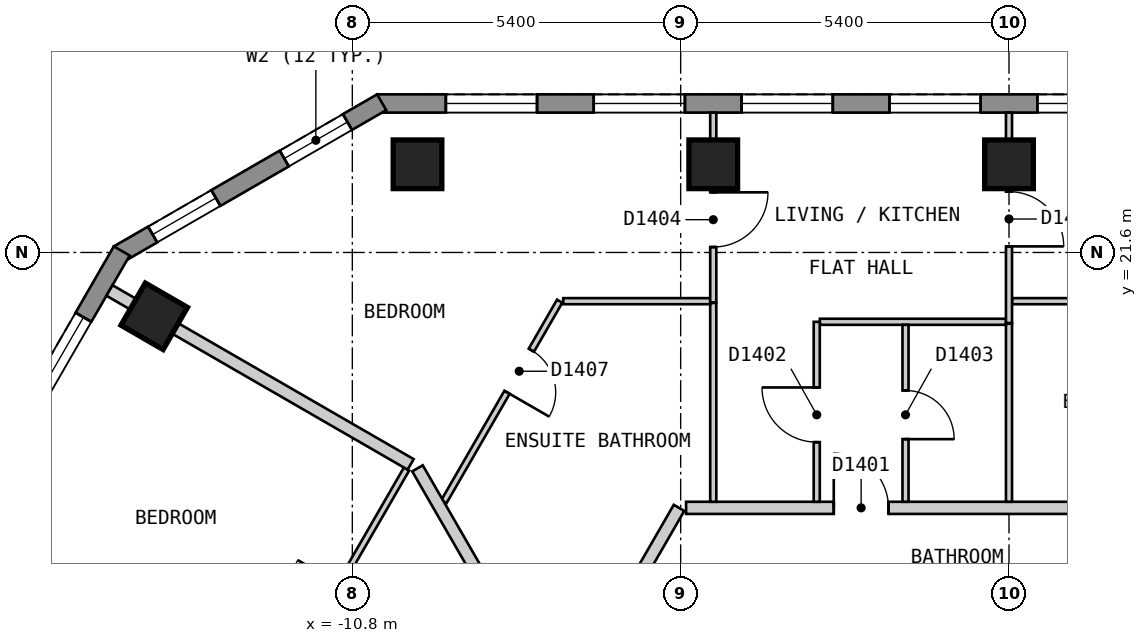
"""IFC4 building model, lengths in metres.
Left out: names, types, materials, properties, quantities, classifications, styles, units other than length and angle.
Written with IfcOpenShell. Run it as: python <this file> out.ifc"""

import sys

from ifc_helpers import new_model, si_unit, direction, frame, frame_2d, origin, origin_2d, place, context, subcontext, project, spatial, polyline, rectangle, outline, extrude, element, fill, save


model = new_model("IFC4")
c1 = context("Model", 3, precision=1e-05, world=origin(), true_north=direction((0.0, 1.0)))
c2 = subcontext(c1, "Body", "Model", "MODEL_VIEW")
j1 = project(units=[si_unit("LENGTHUNIT", "METRE"), si_unit("PLANEANGLEUNIT", "RADIAN")], contexts=[c1])
p1 = place(None, origin())
s1 = spatial("IfcSite", under=j1, at=p1, CompositionType="ELEMENT")
p2 = place(p1, origin())
s2 = spatial("IfcBuilding", under=s1, at=p2, CompositionType="ELEMENT")
p3 = place(p2, frame((0.0, 0.0, 166.2)))
s3 = spatial("IfcBuildingStorey", under=s2, at=p3, CompositionType="ELEMENT", Elevation=166.2)
for number, where, z_axis, x_axis in (
    (1, (0.0, 23.05, 0.0), (0.0, 0.0, 1.0), (-1.0, 0.0, 0.0)),
    (2, (-4.864, 23.05, 0.0), (0.0, 0.0, 1.0), (-1.0, 0.0, 0.0)),
    (3, (-9.728, 23.05, 0.0), (0.0, 0.0, 1.0), (-1.0, 0.0, 0.0)),
    (4, (-14.058, 20.55, 0.0), (0.0, 0.0, 1.0), (-0.5, -0.866, 0.0)),
):
    element("IfcColumn", number, at=place(p3, frame(where, z_axis=z_axis, x_axis=x_axis)), inside=s3, PredefinedType="COLUMN", context=c2, shape_type="SweptSolid", body=[
        extrude(rectangle(XDim=0.8, YDim=0.8, at=origin_2d()), origin(), (0.0, 0.0, 1.0), 3.0),
    ])
p4 = place(p3, frame((10.392, 24.05, 0.0), z_axis=(0.0, 0.0, 1.0), x_axis=(-1.0, 0.0, 0.0)))
e5 = element("IfcWall", 5, at=p4, inside=s3, PredefinedType="SOLIDWALL", context=c2, shape_type="SweptSolid", body=[
    extrude(outline(polyline([(0.0, -0.15), (20.784, -0.15), (20.704, 0.15), (0.08, 0.15), (0.0, -0.15)])), origin(), (0.0, 0.0, 1.0), 2.7),
])
p5 = place(p4, frame((1.13, 0.0, 0.15)))
e6 = element("IfcOpeningElement", 6, at=p5, cuts=e5, PredefinedType="OPENING", context=c2, shape_type="SweptSolid", body=[
    extrude(rectangle(XDim=1.5, YDim=2.1, at=frame_2d((0.75, 1.05))), frame((0.0, 0.16, 0.0), z_axis=(0.0, -1.0, 0.0), x_axis=(1.0, 0.0, 0.0)), (0.0, 0.0, 1.0), 0.32),
])
p6 = place(p4, frame((3.562, 0.0, 0.15)))
e7 = element("IfcOpeningElement", 7, at=p6, cuts=e5, PredefinedType="OPENING", context=c2, shape_type="SweptSolid", body=[
    extrude(rectangle(XDim=1.5, YDim=2.1, at=frame_2d((0.75, 1.05))), frame((0.0, 0.16, 0.0), z_axis=(0.0, -1.0, 0.0), x_axis=(1.0, 0.0, 0.0)), (0.0, 0.0, 1.0), 0.32),
])
p7 = place(p4, frame((5.994, 0.0, 0.15)))
e8 = element("IfcOpeningElement", 8, at=p7, cuts=e5, PredefinedType="OPENING", context=c2, shape_type="SweptSolid", body=[
    extrude(rectangle(XDim=1.5, YDim=2.1, at=frame_2d((0.75, 1.05))), frame((0.0, 0.16, 0.0), z_axis=(0.0, -1.0, 0.0), x_axis=(1.0, 0.0, 0.0)), (0.0, 0.0, 1.0), 0.32),
])
p8 = place(p4, frame((8.426, 0.0, 0.15)))
e9 = element("IfcOpeningElement", 9, at=p8, cuts=e5, PredefinedType="OPENING", context=c2, shape_type="SweptSolid", body=[
    extrude(rectangle(XDim=1.5, YDim=2.1, at=frame_2d((0.75, 1.05))), frame((0.0, 0.16, 0.0), z_axis=(0.0, -1.0, 0.0), x_axis=(1.0, 0.0, 0.0)), (0.0, 0.0, 1.0), 0.32),
])
p9 = place(p4, frame((10.858, 0.0, 0.15)))
e10 = element("IfcOpeningElement", 10, at=p9, cuts=e5, PredefinedType="OPENING", context=c2, shape_type="SweptSolid", body=[
    extrude(rectangle(XDim=1.5, YDim=2.1, at=frame_2d((0.75, 1.05))), frame((0.0, 0.16, 0.0), z_axis=(0.0, -1.0, 0.0), x_axis=(1.0, 0.0, 0.0)), (0.0, 0.0, 1.0), 0.32),
])
p10 = place(p4, frame((13.29, 0.0, 0.15)))
e11 = element("IfcOpeningElement", 11, at=p10, cuts=e5, PredefinedType="OPENING", context=c2, shape_type="SweptSolid", body=[
    extrude(rectangle(XDim=1.5, YDim=2.1, at=frame_2d((0.75, 1.05))), frame((0.0, 0.16, 0.0), z_axis=(0.0, -1.0, 0.0), x_axis=(1.0, 0.0, 0.0)), (0.0, 0.0, 1.0), 0.32),
])
p11 = place(p4, frame((15.722, 0.0, 0.15)))
e12 = element("IfcOpeningElement", 12, at=p11, cuts=e5, PredefinedType="OPENING", context=c2, shape_type="SweptSolid", body=[
    extrude(rectangle(XDim=1.5, YDim=2.1, at=frame_2d((0.75, 1.05))), frame((0.0, 0.16, 0.0), z_axis=(0.0, -1.0, 0.0), x_axis=(1.0, 0.0, 0.0)), (0.0, 0.0, 1.0), 0.32),
])
p12 = place(p4, frame((18.154, 0.0, 0.15)))
e13 = element("IfcOpeningElement", 13, at=p12, cuts=e5, PredefinedType="OPENING", context=c2, shape_type="SweptSolid", body=[
    extrude(rectangle(XDim=1.5, YDim=2.1, at=frame_2d((0.75, 1.05))), frame((0.0, 0.16, 0.0), z_axis=(0.0, -1.0, 0.0), x_axis=(1.0, 0.0, 0.0)), (0.0, 0.0, 1.0), 0.32),
])
p13 = place(p3, frame((-10.317, 24.07, 0.0), z_axis=(0.0, 0.0, 1.0), x_axis=(-0.866022959057, -0.500004234368, 0.0)))
e14 = element("IfcWall", 14, at=p13, inside=s3, PredefinedType="SOLIDWALL", context=c2, shape_type="SweptSolid", body=[
    extrude(outline(polyline([(0.0, -0.15), (5.0, -0.15), (4.92, 0.15), (0.08, 0.15), (0.0, -0.15)])), origin(), (0.0, 0.0, 1.0), 2.7),
])
p14 = place(p13, frame((0.65, 0.0, 0.15)))
e15 = element("IfcOpeningElement", 15, at=p14, cuts=e14, PredefinedType="OPENING", context=c2, shape_type="SweptSolid", body=[
    extrude(rectangle(XDim=1.2, YDim=2.1, at=frame_2d((0.6, 1.05))), frame((0.0, 0.16, 0.0), z_axis=(0.0, -1.0, 0.0), x_axis=(1.0, 0.0, 0.0)), (0.0, 0.0, 1.0), 0.32),
])
p15 = place(p13, frame((3.149, 0.0, 0.15)))
e16 = element("IfcOpeningElement", 16, at=p15, cuts=e14, PredefinedType="OPENING", context=c2, shape_type="SweptSolid", body=[
    extrude(rectangle(XDim=1.2, YDim=2.1, at=frame_2d((0.6, 1.05))), frame((0.0, 0.16, 0.0), z_axis=(0.0, -1.0, 0.0), x_axis=(1.0, 0.0, 0.0)), (0.0, 0.0, 1.0), 0.32),
])
p16 = place(p3, frame((-14.592, 21.625, 0.0), z_axis=(0.0, 0.0, 1.0), x_axis=(-0.500010537973, -0.866019319597, 0.0)))
e17 = element("IfcWall", 17, at=p16, inside=s3, PredefinedType="SOLIDWALL", context=c2, shape_type="SweptSolid", body=[
    extrude(outline(polyline([(0.0, -0.15), (22.863, -0.15), (22.783, 0.15), (0.08, 0.15), (0.0, -0.15)])), origin(), (0.0, 0.0, 1.0), 2.7),
])
p17 = place(p16, frame((1.259, 0.0, 0.15)))
e18 = element("IfcOpeningElement", 18, at=p17, cuts=e17, PredefinedType="OPENING", context=c2, shape_type="SweptSolid", body=[
    extrude(rectangle(XDim=1.5, YDim=2.1, at=frame_2d((0.75, 1.05))), frame((0.0, 0.16, 0.0), z_axis=(0.0, -1.0, 0.0), x_axis=(1.0, 0.0, 0.0)), (0.0, 0.0, 1.0), 0.32),
])
p18 = place(p16, frame((3.952, 0.0, 0.15)))
e19 = element("IfcOpeningElement", 19, at=p18, cuts=e17, PredefinedType="OPENING", context=c2, shape_type="SweptSolid", body=[
    extrude(rectangle(XDim=1.5, YDim=2.1, at=frame_2d((0.75, 1.05))), frame((0.0, 0.16, 0.0), z_axis=(0.0, -1.0, 0.0), x_axis=(1.0, 0.0, 0.0)), (0.0, 0.0, 1.0), 0.32),
])
p19 = place(p16, frame((6.644, 0.0, 0.15)))
e20 = element("IfcOpeningElement", 20, at=p19, cuts=e17, PredefinedType="OPENING", context=c2, shape_type="SweptSolid", body=[
    extrude(rectangle(XDim=1.5, YDim=2.1, at=frame_2d((0.75, 1.05))), frame((0.0, 0.16, 0.0), z_axis=(0.0, -1.0, 0.0), x_axis=(1.0, 0.0, 0.0)), (0.0, 0.0, 1.0), 0.32),
])
p20 = place(p16, frame((9.335, 0.0, 0.15)))
e21 = element("IfcOpeningElement", 21, at=p20, cuts=e17, PredefinedType="OPENING", context=c2, shape_type="SweptSolid", body=[
    extrude(rectangle(XDim=1.5, YDim=2.1, at=frame_2d((0.75, 1.05))), frame((0.0, 0.16, 0.0), z_axis=(0.0, -1.0, 0.0), x_axis=(1.0, 0.0, 0.0)), (0.0, 0.0, 1.0), 0.32),
])
p21 = place(p16, frame((12.028, 0.0, 0.15)))
e22 = element("IfcOpeningElement", 22, at=p21, cuts=e17, PredefinedType="OPENING", context=c2, shape_type="SweptSolid", body=[
    extrude(rectangle(XDim=1.5, YDim=2.1, at=frame_2d((0.75, 1.05))), frame((0.0, 0.16, 0.0), z_axis=(0.0, -1.0, 0.0), x_axis=(1.0, 0.0, 0.0)), (0.0, 0.0, 1.0), 0.32),
])
p22 = place(p16, frame((14.72, 0.0, 0.15)))
e23 = element("IfcOpeningElement", 23, at=p22, cuts=e17, PredefinedType="OPENING", context=c2, shape_type="SweptSolid", body=[
    extrude(rectangle(XDim=1.5, YDim=2.1, at=frame_2d((0.75, 1.05))), frame((0.0, 0.16, 0.0), z_axis=(0.0, -1.0, 0.0), x_axis=(1.0, 0.0, 0.0)), (0.0, 0.0, 1.0), 0.32),
])
p23 = place(p16, frame((17.411, 0.0, 0.15)))
e24 = element("IfcOpeningElement", 24, at=p23, cuts=e17, PredefinedType="OPENING", context=c2, shape_type="SweptSolid", body=[
    extrude(rectangle(XDim=1.5, YDim=2.1, at=frame_2d((0.75, 1.05))), frame((0.0, 0.16, 0.0), z_axis=(0.0, -1.0, 0.0), x_axis=(1.0, 0.0, 0.0)), (0.0, 0.0, 1.0), 0.32),
])
p24 = place(p16, frame((20.104, 0.0, 0.15)))
e25 = element("IfcOpeningElement", 25, at=p24, cuts=e17, PredefinedType="OPENING", context=c2, shape_type="SweptSolid", body=[
    extrude(rectangle(XDim=1.5, YDim=2.1, at=frame_2d((0.75, 1.05))), frame((0.0, 0.16, 0.0), z_axis=(0.0, -1.0, 0.0), x_axis=(1.0, 0.0, 0.0)), (0.0, 0.0, 1.0), 0.32),
])
p25 = place(p3, frame((-5.311, 17.4, 0.0), z_axis=(0.0, 0.0, 1.0), x_axis=(1.0, 0.0, 0.0)))
e26 = element("IfcWall", 26, at=p25, inside=s3, PredefinedType="PARTITIONING", context=c2, shape_type="SweptSolid", body=[
    extrude(rectangle(XDim=10.075, YDim=0.2, at=frame_2d((5.038, 0.0))), origin(), (0.0, 0.0, 1.0), 2.7),
])
p26 = place(p25, frame((2.429, 0.0, 0.0)))
e27 = element("IfcOpeningElement", 27, at=p26, cuts=e26, PredefinedType="OPENING", context=c2, shape_type="SweptSolid", body=[
    extrude(rectangle(XDim=0.9, YDim=2.1, at=frame_2d((0.45, 1.05))), frame((0.0, 0.11, 0.0), z_axis=(0.0, -1.0, 0.0), x_axis=(1.0, 0.0, 0.0)), (0.0, 0.0, 1.0), 0.22),
])
p27 = place(p3, frame((-10.854, 8.0, 0.0), z_axis=(0.0, 0.0, 1.0), x_axis=(0.499997637144, 0.866026767976, 0.0)))
e28 = element("IfcWall", 28, at=p27, inside=s3, PredefinedType="PARTITIONING", context=c2, shape_type="SweptSolid", body=[
    extrude(rectangle(XDim=10.854, YDim=0.2, at=frame_2d((5.427, 0.0))), origin(), (0.0, 0.0, 1.0), 2.7),
])
p28 = place(p27, frame((0.721, 0.0, 0.0)))
e29 = element("IfcOpeningElement", 29, at=p28, cuts=e28, PredefinedType="OPENING", context=c2, shape_type="SweptSolid", body=[
    extrude(rectangle(XDim=1.0, YDim=2.1, at=frame_2d((0.5, 1.05))), frame((0.0, 0.11, 0.0), z_axis=(0.0, -1.0, 0.0), x_axis=(1.0, 0.0, 0.0)), (0.0, 0.0, 1.0), 0.22),
])
p29 = place(p3, frame((-4.864, 20.769, 0.0), z_axis=(0.0, 0.0, 1.0), x_axis=(0.0, -1.0, 0.0)))
e30 = element("IfcWall", 30, at=p29, inside=s3, PredefinedType="PARTITIONING", context=c2, shape_type="SweptSolid", body=[
    extrude(rectangle(XDim=3.269, YDim=0.1, at=frame_2d((1.635, 0.0))), origin(), (0.0, 0.0, 1.0), 2.7),
])
p30 = place(p3, frame((0.0, 20.43, 0.0), z_axis=(0.0, 0.0, 1.0), x_axis=(0.0, -1.0, 0.0)))
e31 = element("IfcWall", 31, at=p30, inside=s3, PredefinedType="PARTITIONING", context=c2, shape_type="SweptSolid", body=[
    extrude(rectangle(XDim=2.93, YDim=0.1, at=frame_2d((1.465, 0.0))), origin(), (0.0, 0.0, 1.0), 2.7),
])
p31 = place(p3, frame((-3.111, 20.46, 0.0), z_axis=(0.0, 0.0, 1.0), x_axis=(1.0, 0.0, 0.0)))
e32 = element("IfcWall", 32, at=p31, inside=s3, PredefinedType="PARTITIONING", context=c2, shape_type="SweptSolid", body=[
    extrude(rectangle(XDim=3.061, YDim=0.1, at=frame_2d((1.531, 0.0))), origin(), (0.0, 0.0, 1.0), 2.7),
])
p32 = place(p3, frame((-7.331, 20.799, 0.0), z_axis=(0.0, 0.0, 1.0), x_axis=(1.0, 0.0, 0.0)))
e33 = element("IfcWall", 33, at=p32, inside=s3, PredefinedType="PARTITIONING", context=c2, shape_type="SweptSolid", body=[
    extrude(rectangle(XDim=2.417, YDim=0.1, at=frame_2d((1.208, 0.0))), origin(), (0.0, 0.0, 1.0), 2.7),
])
p33 = place(p3, frame((0.05, 20.799, 0.0), z_axis=(0.0, 0.0, 1.0), x_axis=(1.0, 0.0, 0.0)))
e34 = element("IfcWall", 34, at=p33, inside=s3, PredefinedType="PARTITIONING", context=c2, shape_type="SweptSolid", body=[
    extrude(rectangle(XDim=4.714, YDim=0.1, at=frame_2d((2.357, 0.0))), origin(), (0.0, 0.0, 1.0), 2.7),
])
p34 = place(p33, frame((1.982, 0.0, 0.0)))
e35 = element("IfcOpeningElement", 35, at=p34, cuts=e34, PredefinedType="OPENING", context=c2, shape_type="SweptSolid", body=[
    extrude(rectangle(XDim=0.8, YDim=2.1, at=frame_2d((0.4, 1.05))), frame((0.0, 0.06, 0.0), z_axis=(0.0, -1.0, 0.0), x_axis=(1.0, 0.0, 0.0)), (0.0, 0.0, 1.0), 0.12),
])
p35 = place(p3, frame((-9.295, 17.5, 0.0), z_axis=(0.0, 0.0, 1.0), x_axis=(0.500060839138, 0.865990275442, 0.0)))
e36 = element("IfcWall", 36, at=p35, inside=s3, PredefinedType="PARTITIONING", context=c2, shape_type="SweptSolid", body=[
    extrude(rectangle(XDim=3.81, YDim=0.1, at=frame_2d((1.905, 0.0))), origin(), (0.0, 0.0, 1.0), 2.7),
])
p36 = place(p35, frame((2.079, 0.0, 0.0)))
e37 = element("IfcOpeningElement", 37, at=p36, cuts=e36, PredefinedType="OPENING", context=c2, shape_type="SweptSolid", body=[
    extrude(rectangle(XDim=0.8, YDim=2.1, at=frame_2d((0.4, 1.05))), frame((0.0, 0.06, 0.0), z_axis=(0.0, -1.0, 0.0), x_axis=(1.0, 0.0, 0.0)), (0.0, 0.0, 1.0), 0.12),
])
p37 = place(p3, frame((-15.704, 8.0, 0.0), z_axis=(0.0, 0.0, 1.0), x_axis=(0.500005637941, 0.866022148693, 0.0)))
e38 = element("IfcWall", 38, at=p37, inside=s3, PredefinedType="PARTITIONING", context=c2, shape_type="SweptSolid", body=[
    extrude(rectangle(XDim=11.592, YDim=0.1, at=frame_2d((5.796, 0.0))), origin(), (0.0, 0.0, 1.0), 2.7),
])
p38 = place(p37, frame((3.132, 0.0, 0.0)))
e39 = element("IfcOpeningElement", 39, at=p38, cuts=e38, PredefinedType="OPENING", context=c2, shape_type="SweptSolid", body=[
    extrude(rectangle(XDim=0.9, YDim=2.1, at=frame_2d((0.45, 1.05))), frame((0.0, 0.06, 0.0), z_axis=(0.0, -1.0, 0.0), x_axis=(1.0, 0.0, 0.0)), (0.0, 0.0, 1.0), 0.12),
])
p39 = place(p37, frame((8.6, 0.0, 0.0)))
e40 = element("IfcOpeningElement", 40, at=p39, cuts=e38, PredefinedType="OPENING", context=c2, shape_type="SweptSolid", body=[
    extrude(rectangle(XDim=0.8, YDim=2.1, at=frame_2d((0.4, 1.05))), frame((0.0, 0.06, 0.0), z_axis=(0.0, -1.0, 0.0), x_axis=(1.0, 0.0, 0.0)), (0.0, 0.0, 1.0), 0.12),
])
p40 = place(p3, frame((0.0, 20.44, 0.0), z_axis=(0.0, 0.0, 1.0), x_axis=(0.0, 1.0, 0.0)))
e41 = element("IfcWall", 41, at=p40, inside=s3, PredefinedType="PARTITIONING", context=c2, shape_type="SweptSolid", body=[
    extrude(rectangle(XDim=3.46, YDim=0.1, at=frame_2d((1.73, 0.0))), origin(), (0.0, 0.0, 1.0), 2.7),
])
p41 = place(p40, frame((1.26, 0.0, 0.0)))
e42 = element("IfcOpeningElement", 42, at=p41, cuts=e41, PredefinedType="OPENING", context=c2, shape_type="SweptSolid", body=[
    extrude(rectangle(XDim=0.9, YDim=2.1, at=frame_2d((0.45, 1.05))), frame((0.0, 0.06, 0.0), z_axis=(0.0, -1.0, 0.0), x_axis=(1.0, 0.0, 0.0)), (0.0, 0.0, 1.0), 0.12),
])
p42 = place(p3, frame((-3.162, 17.5, 0.0), z_axis=(0.0, 0.0, 1.0), x_axis=(0.0, 1.0, 0.0)))
e43 = element("IfcWall", 43, at=p42, inside=s3, PredefinedType="PARTITIONING", context=c2, shape_type="SweptSolid", body=[
    extrude(rectangle(XDim=2.959, YDim=0.1, at=frame_2d((1.479, 0.0))), origin(), (0.0, 0.0, 1.0), 2.7),
])
p43 = place(p42, frame((0.98, 0.0, 0.0)))
e44 = element("IfcOpeningElement", 44, at=p43, cuts=e43, PredefinedType="OPENING", context=c2, shape_type="SweptSolid", body=[
    extrude(rectangle(XDim=0.9, YDim=2.1, at=frame_2d((0.45, 1.05))), frame((0.0, 0.06, 0.0), z_axis=(0.0, -1.0, 0.0), x_axis=(1.0, 0.0, 0.0)), (0.0, 0.0, 1.0), 0.12),
])
p44 = place(p3, frame((-4.864, 20.779, 0.0), z_axis=(0.0, 0.0, 1.0), x_axis=(0.0, 1.0, 0.0)))
e45 = element("IfcWall", 45, at=p44, inside=s3, PredefinedType="PARTITIONING", context=c2, shape_type="SweptSolid", body=[
    extrude(rectangle(XDim=3.121, YDim=0.1, at=frame_2d((1.561, 0.0))), origin(), (0.0, 0.0, 1.0), 2.7),
])
p45 = place(p44, frame((0.91, 0.0, 0.0)))
e46 = element("IfcOpeningElement", 46, at=p45, cuts=e45, PredefinedType="OPENING", context=c2, shape_type="SweptSolid", body=[
    extrude(rectangle(XDim=0.9, YDim=2.1, at=frame_2d((0.45, 1.05))), frame((0.0, 0.06, 0.0), z_axis=(0.0, -1.0, 0.0), x_axis=(1.0, 0.0, 0.0)), (0.0, 0.0, 1.0), 0.12),
])
p46 = place(p3, frame((-1.702, 17.5, 0.0), z_axis=(0.0, 0.0, 1.0), x_axis=(0.0, 1.0, 0.0)))
e47 = element("IfcWall", 47, at=p46, inside=s3, PredefinedType="PARTITIONING", context=c2, shape_type="SweptSolid", body=[
    extrude(rectangle(XDim=2.91, YDim=0.1, at=frame_2d((1.455, 0.0))), origin(), (0.0, 0.0, 1.0), 2.7),
])
p47 = place(p46, frame((1.03, 0.0, 0.0)))
e48 = element("IfcOpeningElement", 48, at=p47, cuts=e47, PredefinedType="OPENING", context=c2, shape_type="SweptSolid", body=[
    extrude(rectangle(XDim=0.8, YDim=2.1, at=frame_2d((0.4, 1.05))), frame((0.0, 0.06, 0.0), z_axis=(0.0, -1.0, 0.0), x_axis=(1.0, 0.0, 0.0)), (0.0, 0.0, 1.0), 0.12),
])
p48 = place(p3, frame((-9.728, 18.05, 0.0), z_axis=(0.0, 0.0, 1.0), x_axis=(0.499921709333, -0.866070600204, 0.0)))
e49 = element("IfcWall", 49, at=p48, inside=s3, PredefinedType="PARTITIONING", context=c2, shape_type="SweptSolid", body=[
    extrude(rectangle(XDim=4.561, YDim=0.2, at=frame_2d((2.28, 0.0))), origin(), (0.0, 0.0, 1.0), 2.7),
])
p49 = place(p3, frame((-14.794, 20.975, 0.0), z_axis=(0.0, 0.0, 1.0), x_axis=(0.865982978614, -0.500073475352, 0.0)))
e50 = element("IfcWall", 50, at=p49, inside=s3, PredefinedType="PARTITIONING", context=c2, shape_type="SweptSolid", body=[
    extrude(rectangle(XDim=5.719, YDim=0.2, at=frame_2d((2.86, 0.0))), origin(), (0.0, 0.0, 1.0), 2.7),
])
p50 = place(p8, origin())
e51 = element("IfcWindow", 51, at=p50, inside=s3, PartitioningType="SINGLE_PANEL", PredefinedType="WINDOW", context=c2, shape_type="SweptSolid", body=[
    extrude(rectangle(XDim=1.5, YDim=2.1, at=frame_2d((0.75, 1.05))), frame((0.0, 0.03, 0.0), z_axis=(0.0, -1.0, 0.0), x_axis=(1.0, 0.0, 0.0)), (0.0, 0.0, 1.0), 0.06),
])
fill(e9, e51)
p51 = place(p9, origin())
e52 = element("IfcWindow", 52, at=p51, inside=s3, PartitioningType="SINGLE_PANEL", PredefinedType="WINDOW", context=c2, shape_type="SweptSolid", body=[
    extrude(rectangle(XDim=1.5, YDim=2.1, at=frame_2d((0.75, 1.05))), frame((0.0, 0.03, 0.0), z_axis=(0.0, -1.0, 0.0), x_axis=(1.0, 0.0, 0.0)), (0.0, 0.0, 1.0), 0.06),
])
fill(e10, e52)
p52 = place(p10, origin())
e53 = element("IfcWindow", 53, at=p52, inside=s3, PartitioningType="SINGLE_PANEL", PredefinedType="WINDOW", context=c2, shape_type="SweptSolid", body=[
    extrude(rectangle(XDim=1.5, YDim=2.1, at=frame_2d((0.75, 1.05))), frame((0.0, 0.03, 0.0), z_axis=(0.0, -1.0, 0.0), x_axis=(1.0, 0.0, 0.0)), (0.0, 0.0, 1.0), 0.06),
])
fill(e11, e53)
p53 = place(p11, origin())
e54 = element("IfcWindow", 54, at=p53, inside=s3, PartitioningType="SINGLE_PANEL", PredefinedType="WINDOW", context=c2, shape_type="SweptSolid", body=[
    extrude(rectangle(XDim=1.5, YDim=2.1, at=frame_2d((0.75, 1.05))), frame((0.0, 0.03, 0.0), z_axis=(0.0, -1.0, 0.0), x_axis=(1.0, 0.0, 0.0)), (0.0, 0.0, 1.0), 0.06),
])
fill(e12, e54)
p54 = place(p12, origin())
e55 = element("IfcWindow", 55, at=p54, inside=s3, PartitioningType="SINGLE_PANEL", PredefinedType="WINDOW", context=c2, shape_type="SweptSolid", body=[
    extrude(rectangle(XDim=1.5, YDim=2.1, at=frame_2d((0.75, 1.05))), frame((0.0, 0.03, 0.0), z_axis=(0.0, -1.0, 0.0), x_axis=(1.0, 0.0, 0.0)), (0.0, 0.0, 1.0), 0.06),
])
fill(e13, e55)
p55 = place(p14, origin())
e56 = element("IfcWindow", 56, at=p55, inside=s3, PartitioningType="SINGLE_PANEL", PredefinedType="WINDOW", context=c2, shape_type="SweptSolid", body=[
    extrude(rectangle(XDim=1.2, YDim=2.1, at=frame_2d((0.6, 1.05))), frame((0.0, 0.03, 0.0), z_axis=(0.0, -1.0, 0.0), x_axis=(1.0, 0.0, 0.0)), (0.0, 0.0, 1.0), 0.06),
])
fill(e15, e56)
p56 = place(p15, origin())
e57 = element("IfcWindow", 57, at=p56, inside=s3, PartitioningType="SINGLE_PANEL", PredefinedType="WINDOW", context=c2, shape_type="SweptSolid", body=[
    extrude(rectangle(XDim=1.2, YDim=2.1, at=frame_2d((0.6, 1.05))), frame((0.0, 0.03, 0.0), z_axis=(0.0, -1.0, 0.0), x_axis=(1.0, 0.0, 0.0)), (0.0, 0.0, 1.0), 0.06),
])
fill(e16, e57)
p57 = place(p17, origin())
e58 = element("IfcWindow", 58, at=p57, inside=s3, PartitioningType="SINGLE_PANEL", PredefinedType="WINDOW", context=c2, shape_type="SweptSolid", body=[
    extrude(rectangle(XDim=1.5, YDim=2.1, at=frame_2d((0.75, 1.05))), frame((0.0, 0.03, 0.0), z_axis=(0.0, -1.0, 0.0), x_axis=(1.0, 0.0, 0.0)), (0.0, 0.0, 1.0), 0.06),
])
fill(e18, e58)
p58 = place(p26, origin())
e59 = element("IfcDoor", 59, at=p58, inside=s3, OperationType="SINGLE_SWING_LEFT", PredefinedType="DOOR", context=c2, shape_type="SweptSolid", body=[
    extrude(rectangle(XDim=0.9, YDim=2.1, at=frame_2d((0.45, 1.05))), frame((0.0, 0.025, 0.0), z_axis=(0.0, -1.0, 0.0), x_axis=(1.0, 0.0, 0.0)), (0.0, 0.0, 1.0), 0.05),
])
fill(e27, e59)
p59 = place(p43, origin())
e60 = element("IfcDoor", 60, at=p59, inside=s3, OperationType="SINGLE_SWING_RIGHT", PredefinedType="DOOR", context=c2, shape_type="SweptSolid", body=[
    extrude(rectangle(XDim=0.9, YDim=2.1, at=frame_2d((0.45, 1.05))), frame((0.0, 0.025, 0.0), z_axis=(0.0, -1.0, 0.0), x_axis=(1.0, 0.0, 0.0)), (0.0, 0.0, 1.0), 0.05),
])
fill(e44, e60)
p60 = place(p47, origin())
e61 = element("IfcDoor", 61, at=p60, inside=s3, OperationType="SINGLE_SWING_LEFT", PredefinedType="DOOR", context=c2, shape_type="SweptSolid", body=[
    extrude(rectangle(XDim=0.8, YDim=2.1, at=frame_2d((0.4, 1.05))), frame((0.0, 0.025, 0.0), z_axis=(0.0, -1.0, 0.0), x_axis=(1.0, 0.0, 0.0)), (0.0, 0.0, 1.0), 0.05),
])
fill(e48, e61)
p61 = place(p45, origin())
e62 = element("IfcDoor", 62, at=p61, inside=s3, OperationType="SINGLE_SWING_RIGHT", PredefinedType="DOOR", context=c2, shape_type="SweptSolid", body=[
    extrude(rectangle(XDim=0.9, YDim=2.1, at=frame_2d((0.45, 1.05))), frame((0.0, 0.025, 0.0), z_axis=(0.0, -1.0, 0.0), x_axis=(1.0, 0.0, 0.0)), (0.0, 0.0, 1.0), 0.05),
])
fill(e46, e62)
p62 = place(p41, origin())
e63 = element("IfcDoor", 63, at=p62, inside=s3, OperationType="SINGLE_SWING_LEFT", PredefinedType="DOOR", context=c2, shape_type="SweptSolid", body=[
    extrude(rectangle(XDim=0.9, YDim=2.1, at=frame_2d((0.45, 1.05))), frame((0.0, 0.025, 0.0), z_axis=(0.0, -1.0, 0.0), x_axis=(1.0, 0.0, 0.0)), (0.0, 0.0, 1.0), 0.05),
])
fill(e42, e63)
p63 = place(p36, origin())
e64 = element("IfcDoor", 64, at=p63, inside=s3, OperationType="SINGLE_SWING_LEFT", PredefinedType="DOOR", context=c2, shape_type="SweptSolid", body=[
    extrude(rectangle(XDim=0.8, YDim=2.1, at=frame_2d((0.4, 1.05))), frame((0.0, 0.025, 0.0), z_axis=(0.0, -1.0, 0.0), x_axis=(1.0, 0.0, 0.0)), (0.0, 0.0, 1.0), 0.05),
])
fill(e37, e64)
save(model, sys.argv[1])
